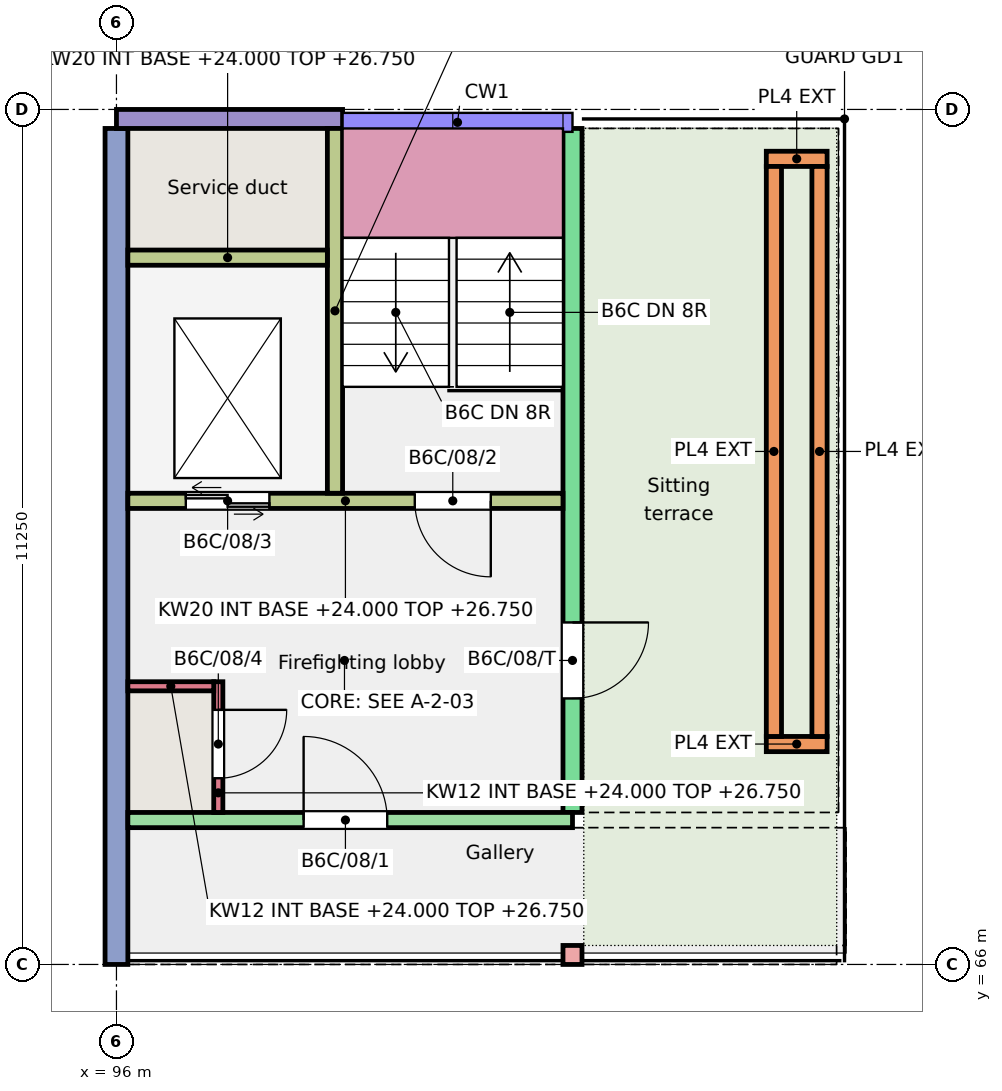
"""IFC4 building model, lengths in metres.
Left out: names, types, materials, properties, quantities, classifications, styles, units other than length and angle.
Written with IfcOpenShell. Run it as: python <this file> out.ifc"""

import sys

from ifc_helpers import new_model, si_unit, direction, frame, frame_2d, origin, origin_2d, place, context, subcontext, project, spatial, rectangle, extrude, element, fill, save


model = new_model("IFC4")
c1 = context("Model", 3, precision=1e-05, world=origin(), true_north=direction((0.0, 1.0)))
c2 = subcontext(c1, "Body", "Model", "MODEL_VIEW")
j1 = project(units=[si_unit("LENGTHUNIT", "METRE"), si_unit("PLANEANGLEUNIT", "RADIAN")], contexts=[c1])
p1 = place(None, origin())
s1 = spatial("IfcSite", under=j1, at=p1, CompositionType="ELEMENT")
p2 = place(p1, origin())
s2 = spatial("IfcBuilding", under=s1, at=p2, CompositionType="ELEMENT")
p3 = place(p2, frame((0.0, 0.0, 24.0)))
s3 = spatial("IfcBuildingStorey", under=s2, at=p3, CompositionType="ELEMENT", Elevation=24.0)
p4 = place(p3, frame((96.0, 66.0, 0.0), z_axis=(0.0, 0.0, 1.0), x_axis=(0.0, 1.0, 0.0)))
e1 = element("IfcWall", 1, at=p4, inside=s3, PredefinedType="SHEAR", context=c2, shape_type="SweptSolid", body=[
    extrude(rectangle(XDim=11.0, YDim=0.3, at=frame_2d((5.5, 0.0))), origin(), (0.0, 0.0, 1.0), 3.0),
])
p5 = place(p3, frame((102.0, 68.0, 0.0), z_axis=(0.0, 0.0, 1.0), x_axis=(0.0, 1.0, 0.0)))
e2 = element("IfcWall", 2, at=p5, inside=s3, PredefinedType="SHEAR", context=c2, shape_type="SweptSolid", body=[
    extrude(rectangle(XDim=9.0, YDim=0.25, at=frame_2d((4.5, 0.0))), origin(), (0.0, 0.0, 1.0), 3.0),
])
p6 = place(p5, frame((1.5, 0.0, 0.0)))
e3 = element("IfcOpeningElement", 3, at=p6, cuts=e2, PredefinedType="OPENING", context=c2, shape_type="SweptSolid", body=[
    extrude(rectangle(XDim=1.0, YDim=2.1, at=frame_2d((0.5, 1.05))), frame((0.0, 0.135, 0.0), z_axis=(0.0, -1.0, 0.0), x_axis=(1.0, 0.0, 0.0)), (0.0, 0.0, 1.0), 0.27),
])
p7 = place(p3, frame((96.0, 77.125, 0.0), z_axis=(0.0, 0.0, 1.0), x_axis=(1.0, 0.0, 0.0)))
e4 = element("IfcWall", 4, at=p7, inside=s3, PredefinedType="SOLIDWALL", context=c2, shape_type="SweptSolid", body=[
    extrude(rectangle(XDim=2.975, YDim=0.25, at=frame_2d((1.488, 0.0))), origin(), (0.0, 0.0, 1.0), 3.0),
])
p8 = place(p3, frame((96.15, 67.9, 0.0), z_axis=(0.0, 0.0, 1.0), x_axis=(1.0, 0.0, 0.0)))
e5 = element("IfcWall", 5, at=p8, inside=s3, PredefinedType="SHEAR", context=c2, shape_type="SweptSolid", body=[
    extrude(rectangle(XDim=5.85, YDim=0.2, at=frame_2d((2.925, 0.0))), origin(), (0.0, 0.0, 1.0), 2.75),
])
p9 = place(p8, frame((2.312, 0.0, 0.0)))
e6 = element("IfcOpeningElement", 6, at=p9, cuts=e5, PredefinedType="OPENING", context=c2, shape_type="SweptSolid", body=[
    extrude(rectangle(XDim=1.1, YDim=2.1, at=frame_2d((0.55, 1.05))), frame((0.0, 0.11, 0.0), z_axis=(0.0, -1.0, 0.0), x_axis=(1.0, 0.0, 0.0)), (0.0, 0.0, 1.0), 0.22),
])
p10 = place(p3, frame((96.15, 72.1, 0.0), z_axis=(0.0, 0.0, 1.0), x_axis=(1.0, 0.0, 0.0)))
e7 = element("IfcWall", 7, at=p10, inside=s3, PredefinedType="SHEAR", context=c2, shape_type="SweptSolid", body=[
    extrude(rectangle(XDim=5.725, YDim=0.2, at=frame_2d((2.863, 0.0))), origin(), (0.0, 0.0, 1.0), 2.75),
])
p11 = place(p10, frame((3.775, 0.0, 0.0)))
e8 = element("IfcOpeningElement", 8, at=p11, cuts=e7, PredefinedType="OPENING", context=c2, shape_type="SweptSolid", body=[
    extrude(rectangle(XDim=1.0, YDim=2.1, at=frame_2d((0.5, 1.05))), frame((0.0, 0.11, 0.0), z_axis=(0.0, -1.0, 0.0), x_axis=(1.0, 0.0, 0.0)), (0.0, 0.0, 1.0), 0.22),
])
p12 = place(p10, frame((0.762, 0.0, 0.0)))
e9 = element("IfcOpeningElement", 9, at=p12, cuts=e7, PredefinedType="OPENING", context=c2, shape_type="SweptSolid", body=[
    extrude(rectangle(XDim=1.1, YDim=2.1, at=frame_2d((0.55, 1.05))), frame((0.0, 0.11, 0.0), z_axis=(0.0, -1.0, 0.0), x_axis=(1.0, 0.0, 0.0)), (0.0, 0.0, 1.0), 0.22),
])
p13 = place(p3, frame((98.875, 72.2, 0.0), z_axis=(0.0, 0.0, 1.0), x_axis=(0.0, 1.0, 0.0)))
e10 = element("IfcWall", 10, at=p13, inside=s3, PredefinedType="SHEAR", context=c2, shape_type="SweptSolid", body=[
    extrude(rectangle(XDim=4.8, YDim=0.2, at=frame_2d((2.4, 0.0))), origin(), (0.0, 0.0, 1.0), 2.75),
])
p14 = place(p3, frame((96.15, 75.3, 0.0), z_axis=(0.0, 0.0, 1.0), x_axis=(1.0, 0.0, 0.0)))
e11 = element("IfcWall", 11, at=p14, inside=s3, PredefinedType="SHEAR", context=c2, shape_type="SweptSolid", body=[
    extrude(rectangle(XDim=2.625, YDim=0.2, at=frame_2d((1.312, 0.0))), origin(), (0.0, 0.0, 1.0), 2.75),
])
p15 = place(p3, frame((97.34, 68.0, 0.0), z_axis=(0.0, 0.0, 1.0), x_axis=(0.0, 1.0, 0.0)))
e12 = element("IfcWall", 12, at=p15, inside=s3, PredefinedType="SHEAR", context=c2, shape_type="SweptSolid", body=[
    extrude(rectangle(XDim=1.72, YDim=0.12, at=frame_2d((0.86, 0.0))), origin(), (0.0, 0.0, 1.0), 2.75),
])
p16 = place(p15, frame((0.45, 0.0, 0.0)))
e13 = element("IfcOpeningElement", 13, at=p16, cuts=e12, PredefinedType="OPENING", context=c2, shape_type="SweptSolid", body=[
    extrude(rectangle(XDim=0.9, YDim=2.1, at=frame_2d((0.45, 1.05))), frame((0.0, 0.07, 0.0), z_axis=(0.0, -1.0, 0.0), x_axis=(1.0, 0.0, 0.0)), (0.0, 0.0, 1.0), 0.14),
])
p17 = place(p3, frame((96.15, 69.66, 0.0), z_axis=(0.0, 0.0, 1.0), x_axis=(1.0, 0.0, 0.0)))
e14 = element("IfcWall", 14, at=p17, inside=s3, PredefinedType="SHEAR", context=c2, shape_type="SweptSolid", body=[
    extrude(rectangle(XDim=1.13, YDim=0.12, at=frame_2d((0.565, 0.0))), origin(), (0.0, 0.0, 1.0), 2.75),
])
p18 = place(p3, frame((102.0, 66.125, 0.0), z_axis=(0.0, 0.0, 1.0), x_axis=(1.0, 0.0, 0.0)))
e15 = element("IfcColumn", 15, at=p18, inside=s3, PredefinedType="COLUMN", context=c2, shape_type="SweptSolid", body=[
    extrude(rectangle(XDim=0.25, YDim=0.25, at=origin_2d()), origin(), (0.0, 0.0, 1.0), 3.0),
])
for number, where, z_axis, x_axis in (
    (16, (104.55, 68.9, 0.01), (0.0, 0.0, 1.0), (1.0, 0.0, 0.0)),
    (17, (104.55, 76.6, 0.01), (0.0, 0.0, 1.0), (1.0, 0.0, 0.0)),
):
    element("IfcWall", number, at=place(p3, frame(where, z_axis=z_axis, x_axis=x_axis)), inside=s3, PredefinedType="SOLIDWALL", context=c2, shape_type="SweptSolid", body=[
        extrude(rectangle(XDim=0.8, YDim=0.2, at=frame_2d((0.4, 0.0))), origin(), (0.0, 0.0, 1.0), 0.45),
    ])
for number, where, z_axis, x_axis in (
    (18, (104.65, 69.0, 0.01), (0.0, 0.0, 1.0), (0.0, 1.0, 0.0)),
    (19, (105.25, 69.0, 0.01), (0.0, 0.0, 1.0), (0.0, 1.0, 0.0)),
):
    element("IfcWall", number, at=place(p3, frame(where, z_axis=z_axis, x_axis=x_axis)), inside=s3, PredefinedType="SOLIDWALL", context=c2, shape_type="SweptSolid", body=[
        extrude(rectangle(XDim=7.5, YDim=0.2, at=frame_2d((3.75, 0.0))), origin(), (0.0, 0.0, 1.0), 0.45),
    ])
p19 = place(p9, origin())
e20 = element("IfcDoor", 20, at=p19, inside=s3, OperationType="SINGLE_SWING_LEFT", PredefinedType="DOOR", context=c2, shape_type="SweptSolid", body=[
    extrude(rectangle(XDim=1.1, YDim=2.1, at=frame_2d((0.55, 1.05))), frame((0.0, 0.025, 0.0), z_axis=(0.0, -1.0, 0.0), x_axis=(1.0, 0.0, 0.0)), (0.0, 0.0, 1.0), 0.05),
])
fill(e6, e20)
p20 = place(p11, origin())
e21 = element("IfcDoor", 21, at=p20, inside=s3, OperationType="SINGLE_SWING_RIGHT", PredefinedType="DOOR", context=c2, shape_type="SweptSolid", body=[
    extrude(rectangle(XDim=1.0, YDim=2.1, at=frame_2d((0.5, 1.05))), frame((0.0, 0.025, 0.0), z_axis=(0.0, -1.0, 0.0), x_axis=(1.0, 0.0, 0.0)), (0.0, 0.0, 1.0), 0.05),
])
fill(e8, e21)
p21 = place(p12, origin())
e22 = element("IfcDoor", 22, at=p21, inside=s3, OperationType="DOUBLE_DOOR_SLIDING", PredefinedType="DOOR", context=c2, shape_type="SweptSolid", body=[
    extrude(rectangle(XDim=1.1, YDim=2.1, at=frame_2d((0.55, 1.05))), frame((0.0, 0.025, 0.0), z_axis=(0.0, -1.0, 0.0), x_axis=(1.0, 0.0, 0.0)), (0.0, 0.0, 1.0), 0.05),
])
fill(e9, e22)
p22 = place(p16, origin())
e23 = element("IfcDoor", 23, at=p22, inside=s3, OperationType="SINGLE_SWING_RIGHT", PredefinedType="DOOR", context=c2, shape_type="SweptSolid", body=[
    extrude(rectangle(XDim=0.9, YDim=2.1, at=frame_2d((0.45, 1.05))), frame((0.0, 0.025, 0.0), z_axis=(0.0, -1.0, 0.0), x_axis=(1.0, 0.0, 0.0)), (0.0, 0.0, 1.0), 0.05),
])
fill(e13, e23)
p23 = place(p6, origin())
e24 = element("IfcDoor", 24, at=p23, inside=s3, OperationType="SINGLE_SWING_RIGHT", PredefinedType="DOOR", context=c2, shape_type="SweptSolid", body=[
    extrude(rectangle(XDim=1.0, YDim=2.1, at=frame_2d((0.5, 1.05))), frame((0.0, 0.025, 0.0), z_axis=(0.0, -1.0, 0.0), x_axis=(1.0, 0.0, 0.0)), (0.0, 0.0, 1.0), 0.05),
])
fill(e3, e24)
save(model, sys.argv[1])
